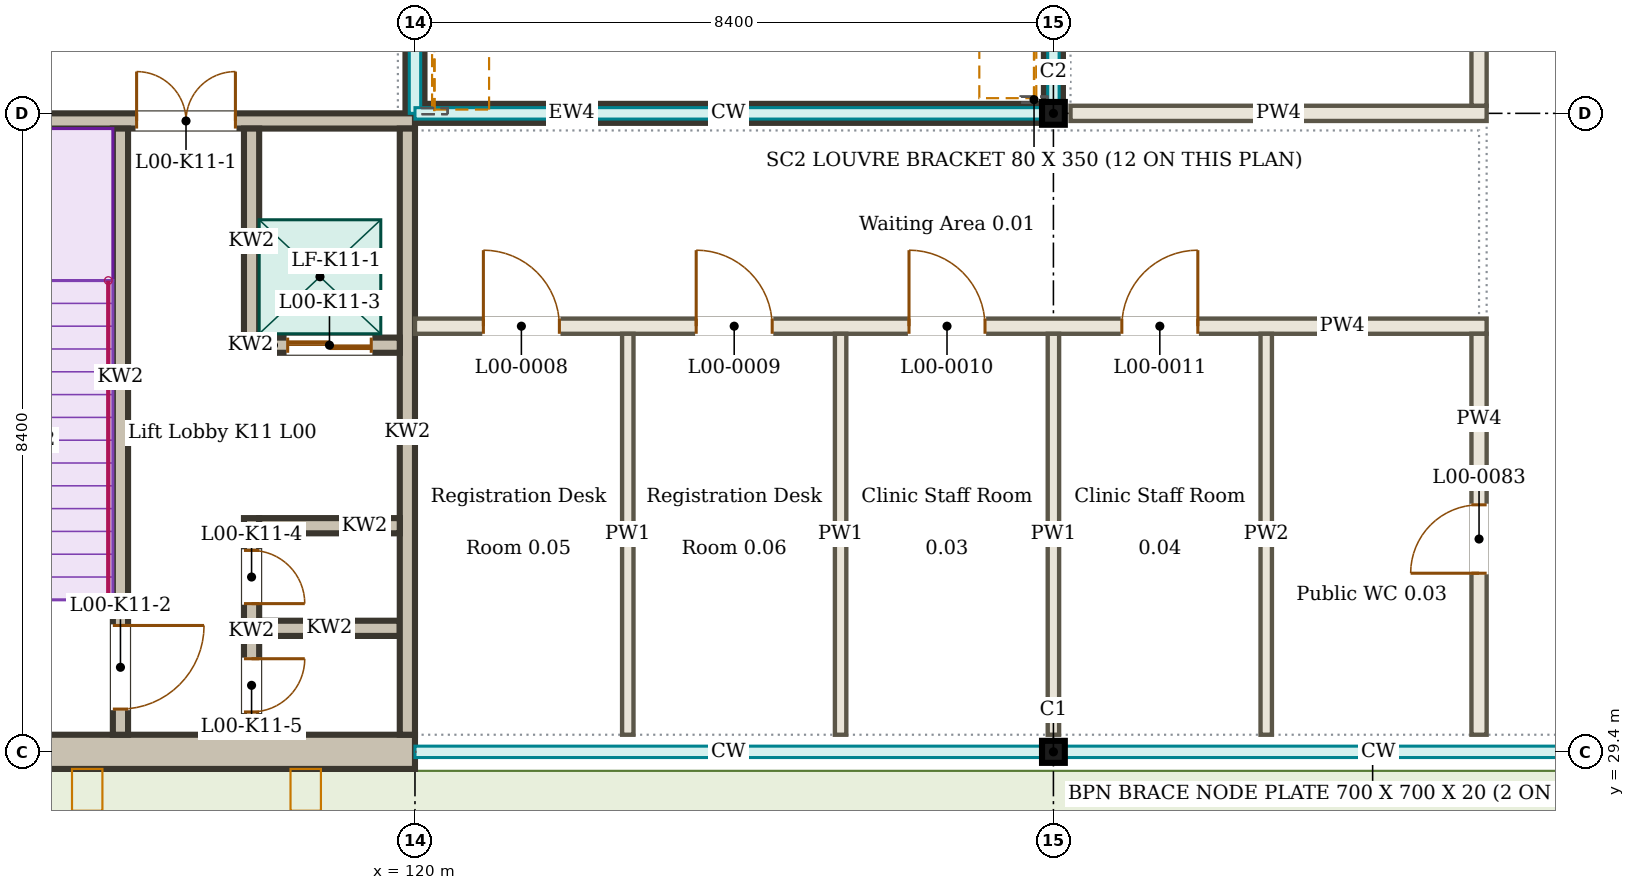
"""IFC4 building model, lengths in metres.
Left out: names, types, materials, properties, quantities, classifications, styles, units other than length and angle.
Written with IfcOpenShell. Run it as: python <this file> out.ifc"""

import sys

from ifc_helpers import new_model, si_unit, direction, frame, frame_2d, origin, origin_2d, place, context, subcontext, project, spatial, rectangle, i_section, extrude, element, fill, save


model = new_model("IFC4")
c1 = context("Model", 3, precision=1e-05, world=origin(), true_north=direction((0.0, 1.0)))
c2 = subcontext(c1, "Body", "Model", "MODEL_VIEW")
j1 = project(units=[si_unit("LENGTHUNIT", "METRE"), si_unit("PLANEANGLEUNIT", "RADIAN")], contexts=[c1])
p1 = place(None, origin())
s1 = spatial("IfcSite", under=j1, at=p1, CompositionType="ELEMENT")
p2 = place(p1, origin())
s2 = spatial("IfcBuilding", under=s1, at=p2, CompositionType="ELEMENT")
p3 = place(p2, origin())
s3 = spatial("IfcBuildingStorey", under=s2, at=p3, CompositionType="ELEMENT", Elevation=0.0)
p4 = place(p3, frame((128.4, 29.4, 0.0), z_axis=(0.0, 0.0, 1.0), x_axis=(1.0, 0.0, 0.0)))
e1 = element("IfcColumn", 1, at=p4, inside=s3, PredefinedType="COLUMN", context=c2, shape_type="SweptSolid", body=[
    extrude(i_section(OverallWidth=0.3, OverallDepth=0.29, WebThickness=0.009, FlangeThickness=0.014, FilletRadius=0.027, at=origin_2d()), origin(), (0.0, 0.0, 1.0), 4.5),
])
p5 = place(p3, frame((128.4, 37.8, 0.0), z_axis=(0.0, 0.0, 1.0), x_axis=(1.0, 0.0, 0.0)))
e2 = element("IfcColumn", 2, at=p5, inside=s3, PredefinedType="COLUMN", context=c2, shape_type="SweptSolid", body=[
    extrude(i_section(OverallWidth=0.3, OverallDepth=0.3, WebThickness=0.011, FlangeThickness=0.019, FilletRadius=0.027, at=origin_2d()), origin(), (0.0, 0.0, 1.0), 4.5),
])
p6 = place(p3, frame((120.0, 37.8, 0.0), z_axis=(0.0, 0.0, 1.0), x_axis=(0.0, 1.0, 0.0)))
e3 = element("IfcWall", 3, at=p6, inside=s3, PredefinedType="SOLIDWALL", context=c2, shape_type="SweptSolid", body=[
    extrude(rectangle(XDim=8.25, YDim=0.25, at=frame_2d((4.125, 0.0))), origin(), (0.0, 0.0, 1.0), 0.45),
])
p7 = place(p3, frame((120.16, 37.8, 3.82), z_axis=(0.0, 0.0, 1.0), x_axis=(0.0, 1.0, 0.0)))
e4 = element("IfcWall", 4, at=p7, inside=s3, PredefinedType="SOLIDWALL", context=c2, shape_type="SweptSolid", body=[
    extrude(rectangle(XDim=8.25, YDim=0.13, at=frame_2d((4.125, 0.0))), origin(), (0.0, 0.0, 1.0), 0.68),
])
p8 = place(p3, frame((120.0, 37.8, 0.0), z_axis=(0.0, 0.0, 1.0), x_axis=(1.0, 0.0, 0.0)))
e5 = element("IfcWall", 5, at=p8, inside=s3, PredefinedType="SOLIDWALL", context=c2, shape_type="SweptSolid", body=[
    extrude(rectangle(XDim=8.25, YDim=0.25, at=frame_2d((4.125, 0.0))), origin(), (0.0, 0.0, 1.0), 0.45),
])
p9 = place(p3, frame((120.0, 37.96, 3.82), z_axis=(0.0, 0.0, 1.0), x_axis=(1.0, 0.0, 0.0)))
e6 = element("IfcWall", 6, at=p9, inside=s3, PredefinedType="SOLIDWALL", context=c2, shape_type="SweptSolid", body=[
    extrude(rectangle(XDim=8.25, YDim=0.13, at=frame_2d((4.125, 0.0))), origin(), (0.0, 0.0, 1.0), 0.68),
])
p10 = place(p3, frame((128.4, 37.95, 0.0), z_axis=(0.0, 0.0, 1.0), x_axis=(0.0, 1.0, 0.0)))
e7 = element("IfcWall", 7, at=p10, inside=s3, PredefinedType="SOLIDWALL", context=c2, shape_type="SweptSolid", body=[
    extrude(rectangle(XDim=8.1, YDim=0.25, at=frame_2d((4.05, 0.0))), origin(), (0.0, 0.0, 1.0), 0.45),
])
p11 = place(p3, frame((128.24, 37.95, 3.82), z_axis=(0.0, 0.0, 1.0), x_axis=(0.0, 1.0, 0.0)))
e8 = element("IfcWall", 8, at=p11, inside=s3, PredefinedType="SOLIDWALL", context=c2, shape_type="SweptSolid", body=[
    extrude(rectangle(XDim=8.1, YDim=0.13, at=frame_2d((4.05, 0.0))), origin(), (0.0, 0.0, 1.0), 0.68),
])
p12 = place(p3, frame((120.0, 35.0, 0.0), z_axis=(0.0, 0.0, 1.0), x_axis=(1.0, 0.0, 0.0)))
e9 = element("IfcWall", 9, at=p12, inside=s3, PredefinedType="PARTITIONING", context=c2, shape_type="SweptSolid", body=[
    extrude(rectangle(XDim=14.1, YDim=0.2, at=frame_2d((7.05, 0.0))), origin(), (0.0, 0.0, 1.0), 3.8),
])
p13 = place(p12, frame((0.9, 0.0, 0.0)))
e10 = element("IfcOpeningElement", 10, at=p13, cuts=e9, PredefinedType="OPENING", context=c2, shape_type="SweptSolid", body=[
    extrude(rectangle(XDim=1.0, YDim=2.1, at=frame_2d((0.5, 1.05))), frame((0.0, 0.11, 0.0), z_axis=(0.0, -1.0, 0.0), x_axis=(1.0, 0.0, 0.0)), (0.0, 0.0, 1.0), 0.22),
])
p14 = place(p12, frame((3.7, 0.0, 0.0)))
e11 = element("IfcOpeningElement", 11, at=p14, cuts=e9, PredefinedType="OPENING", context=c2, shape_type="SweptSolid", body=[
    extrude(rectangle(XDim=1.0, YDim=2.1, at=frame_2d((0.5, 1.05))), frame((0.0, 0.11, 0.0), z_axis=(0.0, -1.0, 0.0), x_axis=(1.0, 0.0, 0.0)), (0.0, 0.0, 1.0), 0.22),
])
p15 = place(p12, frame((6.5, 0.0, 0.0)))
e12 = element("IfcOpeningElement", 12, at=p15, cuts=e9, PredefinedType="OPENING", context=c2, shape_type="SweptSolid", body=[
    extrude(rectangle(XDim=1.0, YDim=2.1, at=frame_2d((0.5, 1.05))), frame((0.0, 0.11, 0.0), z_axis=(0.0, -1.0, 0.0), x_axis=(1.0, 0.0, 0.0)), (0.0, 0.0, 1.0), 0.22),
])
p16 = place(p12, frame((9.3, 0.0, 0.0)))
e13 = element("IfcOpeningElement", 13, at=p16, cuts=e9, PredefinedType="OPENING", context=c2, shape_type="SweptSolid", body=[
    extrude(rectangle(XDim=1.0, YDim=2.1, at=frame_2d((0.5, 1.05))), frame((0.0, 0.11, 0.0), z_axis=(0.0, -1.0, 0.0), x_axis=(1.0, 0.0, 0.0)), (0.0, 0.0, 1.0), 0.22),
])
p17 = place(p3, frame((128.625, 37.8, 0.0), z_axis=(0.0, 0.0, 1.0), x_axis=(1.0, 0.0, 0.0)))
e14 = element("IfcWall", 14, at=p17, inside=s3, PredefinedType="PARTITIONING", context=c2, shape_type="SweptSolid", body=[
    extrude(rectangle(XDim=5.475, YDim=0.2, at=frame_2d((2.738, 0.0))), origin(), (0.0, 0.0, 1.0), 3.8),
])
for number, where, z_axis, x_axis in (
    (15, (122.8, 29.625, 0.0), (0.0, 0.0, 1.0), (0.0, 1.0, 0.0)),
    (16, (125.6, 29.625, 0.0), (0.0, 0.0, 1.0), (0.0, 1.0, 0.0)),
):
    element("IfcWall", number, at=place(p3, frame(where, z_axis=z_axis, x_axis=x_axis)), inside=s3, PredefinedType="PARTITIONING", context=c2, shape_type="SweptSolid", body=[
        extrude(rectangle(XDim=5.275, YDim=0.15, at=frame_2d((2.637, 0.0))), origin(), (0.0, 0.0, 1.0), 3.95),
    ])
p18 = place(p3, frame((128.4, 29.625, 0.0), z_axis=(0.0, 0.0, 1.0), x_axis=(0.0, 1.0, 0.0)))
e17 = element("IfcWall", 17, at=p18, inside=s3, PredefinedType="PARTITIONING", context=c2, shape_type="SweptSolid", body=[
    extrude(rectangle(XDim=5.275, YDim=0.15, at=frame_2d((2.637, 0.0))), origin(), (0.0, 0.0, 1.0), 3.8),
])
p19 = place(p3, frame((131.2, 29.625, 0.0), z_axis=(0.0, 0.0, 1.0), x_axis=(0.0, 1.0, 0.0)))
e18 = element("IfcWall", 18, at=p19, inside=s3, PredefinedType="PARTITIONING", context=c2, shape_type="SweptSolid", body=[
    extrude(rectangle(XDim=5.275, YDim=0.15, at=frame_2d((2.637, 0.0))), origin(), (0.0, 0.0, 1.0), 3.95),
])
p20 = place(p3, frame((134.0, 29.625, 0.0), z_axis=(0.0, 0.0, 1.0), x_axis=(0.0, 1.0, 0.0)))
e19 = element("IfcWall", 19, at=p20, inside=s3, PredefinedType="PARTITIONING", context=c2, shape_type="SweptSolid", body=[
    extrude(rectangle(XDim=5.275, YDim=0.2, at=frame_2d((2.637, 0.0))), origin(), (0.0, 0.0, 1.0), 3.95),
])
p21 = place(p20, frame((2.125, 0.0, 0.0)))
e20 = element("IfcOpeningElement", 20, at=p21, cuts=e19, PredefinedType="OPENING", context=c2, shape_type="SweptSolid", body=[
    extrude(rectangle(XDim=0.9, YDim=2.1, at=frame_2d((0.45, 1.05))), frame((0.0, 0.11, 0.0), z_axis=(0.0, -1.0, 0.0), x_axis=(1.0, 0.0, 0.0)), (0.0, 0.0, 1.0), 0.22),
])
p22 = place(p3, frame((134.0, 37.9, 0.0), z_axis=(0.0, 0.0, 1.0), x_axis=(0.0, 1.0, 0.0)))
e21 = element("IfcWall", 21, at=p22, inside=s3, PredefinedType="PARTITIONING", context=c2, shape_type="SweptSolid", body=[
    extrude(rectangle(XDim=8.225, YDim=0.2, at=frame_2d((4.113, 0.0))), origin(), (0.0, 0.0, 1.0), 3.8),
])
p23 = place(p22, frame((3.6, 0.0, 0.0)))
e22 = element("IfcOpeningElement", 22, at=p23, cuts=e21, PredefinedType="OPENING", context=c2, shape_type="SweptSolid", body=[
    extrude(rectangle(XDim=1.0, YDim=2.1, at=frame_2d((0.5, 1.05))), frame((0.0, 0.11, 0.0), z_axis=(0.0, -1.0, 0.0), x_axis=(1.0, 0.0, 0.0)), (0.0, 0.0, 1.0), 0.22),
])
p24 = place(p3, frame((111.825, 37.7, 0.0), z_axis=(0.0, 0.0, 1.0), x_axis=(1.0, 0.0, 0.0)))
e23 = element("IfcWall", 23, at=p24, inside=s3, PredefinedType="SOLIDWALL", context=c2, shape_type="SweptSolid", body=[
    extrude(rectangle(XDim=8.175, YDim=0.2, at=frame_2d((4.087, 0.0))), origin(), (0.0, 0.0, 1.0), 4.5),
])
p25 = place(p24, frame((4.512, 0.0, 0.0)))
e24 = element("IfcOpeningElement", 24, at=p25, cuts=e23, PredefinedType="OPENING", context=c2, shape_type="SweptSolid", body=[
    extrude(rectangle(XDim=1.3, YDim=2.1, at=frame_2d((0.65, 1.05))), frame((0.0, 0.11, 0.0), z_axis=(0.0, -1.0, 0.0), x_axis=(1.0, 0.0, 0.0)), (0.0, 0.0, 1.0), 0.22),
])
p26 = place(p3, frame((111.375, 29.4, 0.0), z_axis=(0.0, 0.0, 1.0), x_axis=(1.0, 0.0, 0.0)))
e25 = element("IfcWall", 25, at=p26, inside=s3, PredefinedType="SOLIDWALL", context=c2, shape_type="SweptSolid", body=[
    extrude(rectangle(XDim=8.625, YDim=0.45, at=frame_2d((4.312, 0.0))), origin(), (0.0, 0.0, 1.0), 4.5),
])
p27 = place(p26, frame((1.9, 0.0, 0.0)))
e26 = element("IfcOpeningElement", 26, at=p27, cuts=e25, PredefinedType="OPENING", context=c2, shape_type="SweptSolid", body=[
    extrude(rectangle(XDim=1.3, YDim=2.1, at=frame_2d((0.65, 1.05))), frame((0.0, 0.235, 0.0), z_axis=(0.0, -1.0, 0.0), x_axis=(1.0, 0.0, 0.0)), (0.0, 0.0, 1.0), 0.47),
])
p28 = place(p3, frame((119.9, 37.6, 0.0), z_axis=(0.0, 0.0, 1.0), x_axis=(0.0, -1.0, 0.0)))
e27 = element("IfcWall", 27, at=p28, inside=s3, PredefinedType="SOLIDWALL", context=c2, shape_type="SweptSolid", body=[
    extrude(rectangle(XDim=7.975, YDim=0.2, at=frame_2d((3.988, 0.0))), origin(), (0.0, 0.0, 1.0), 4.5),
])
p29 = place(p3, frame((116.125, 37.6, 0.0), z_axis=(0.0, 0.0, 1.0), x_axis=(0.0, -1.0, 0.0)))
e28 = element("IfcWall", 28, at=p29, inside=s3, PredefinedType="SOLIDWALL", context=c2, shape_type="SweptSolid", body=[
    extrude(rectangle(XDim=7.975, YDim=0.2, at=frame_2d((3.988, 0.0))), origin(), (0.0, 0.0, 1.0), 4.5),
])
p30 = place(p29, frame((6.538, 0.0, 0.0)))
e29 = element("IfcOpeningElement", 29, at=p30, cuts=e28, PredefinedType="OPENING", context=c2, shape_type="SweptSolid", body=[
    extrude(rectangle(XDim=1.1, YDim=2.1, at=frame_2d((0.55, 1.05))), frame((0.0, 0.11, 0.0), z_axis=(0.0, -1.0, 0.0), x_axis=(1.0, 0.0, 0.0)), (0.0, 0.0, 1.0), 0.22),
])
p31 = place(p3, frame((117.85, 37.6, 0.0), z_axis=(0.0, 0.0, 1.0), x_axis=(0.0, -1.0, 0.0)))
e30 = element("IfcWall", 30, at=p31, inside=s3, PredefinedType="SOLIDWALL", context=c2, shape_type="SweptSolid", body=[
    extrude(rectangle(XDim=2.95, YDim=0.2, at=frame_2d((1.475, 0.0))), origin(), (0.0, 0.0, 1.0), 4.5),
])
p32 = place(p3, frame((117.85, 32.475, 0.0), z_axis=(0.0, 0.0, 1.0), x_axis=(0.0, -1.0, 0.0)))
e31 = element("IfcWall", 31, at=p32, inside=s3, PredefinedType="SOLIDWALL", context=c2, shape_type="SweptSolid", body=[
    extrude(rectangle(XDim=2.85, YDim=0.2, at=frame_2d((1.425, 0.0))), origin(), (0.0, 0.0, 1.0), 4.35),
])
p33 = place(p32, frame((0.425, 0.0, 0.0)))
e32 = element("IfcOpeningElement", 32, at=p33, cuts=e31, PredefinedType="OPENING", context=c2, shape_type="SweptSolid", body=[
    extrude(rectangle(XDim=0.7, YDim=2.1, at=frame_2d((0.35, 1.05))), frame((0.0, 0.11, 0.0), z_axis=(0.0, -1.0, 0.0), x_axis=(1.0, 0.0, 0.0)), (0.0, 0.0, 1.0), 0.22),
])
p34 = place(p32, frame((1.85, 0.0, 0.0)))
e33 = element("IfcOpeningElement", 33, at=p34, cuts=e31, PredefinedType="OPENING", context=c2, shape_type="SweptSolid", body=[
    extrude(rectangle(XDim=0.7, YDim=2.1, at=frame_2d((0.35, 1.05))), frame((0.0, 0.11, 0.0), z_axis=(0.0, -1.0, 0.0), x_axis=(1.0, 0.0, 0.0)), (0.0, 0.0, 1.0), 0.22),
])
p35 = place(p3, frame((117.95, 34.75, 0.0), z_axis=(0.0, 0.0, 1.0), x_axis=(1.0, 0.0, 0.0)))
e34 = element("IfcWall", 34, at=p35, inside=s3, PredefinedType="SOLIDWALL", context=c2, shape_type="SweptSolid", body=[
    extrude(rectangle(XDim=1.85, YDim=0.2, at=frame_2d((0.925, 0.0))), origin(), (0.0, 0.0, 1.0), 4.5),
])
p36 = place(p35, frame((0.375, 0.0, 0.0)))
e35 = element("IfcOpeningElement", 35, at=p36, cuts=e34, PredefinedType="OPENING", context=c2, shape_type="SweptSolid", body=[
    extrude(rectangle(XDim=1.1, YDim=2.1, at=frame_2d((0.55, 1.05))), frame((0.0, 0.11, 0.0), z_axis=(0.0, -1.0, 0.0), x_axis=(1.0, 0.0, 0.0)), (0.0, 0.0, 1.0), 0.22),
])
for number, where, z_axis, x_axis in (
    (36, (117.95, 32.375, 0.0), (0.0, 0.0, 1.0), (1.0, 0.0, 0.0)),
    (37, (117.95, 31.025, 0.0), (0.0, 0.0, 1.0), (1.0, 0.0, 0.0)),
):
    element("IfcWall", number, at=place(p3, frame(where, z_axis=z_axis, x_axis=x_axis)), inside=s3, PredefinedType="SOLIDWALL", context=c2, shape_type="SweptSolid", body=[
        extrude(rectangle(XDim=1.85, YDim=0.2, at=frame_2d((0.925, 0.0))), origin(), (0.0, 0.0, 1.0), 4.35),
    ])
p37 = place(p13, origin())
e38 = element("IfcDoor", 38, at=p37, inside=s3, OperationType="SINGLE_SWING_LEFT", PredefinedType="DOOR", context=c2, shape_type="SweptSolid", body=[
    extrude(rectangle(XDim=1.0, YDim=2.1, at=frame_2d((0.5, 1.05))), frame((0.0, 0.025, 0.0), z_axis=(0.0, -1.0, 0.0), x_axis=(1.0, 0.0, 0.0)), (0.0, 0.0, 1.0), 0.05),
])
fill(e10, e38)
p38 = place(p14, origin())
e39 = element("IfcDoor", 39, at=p38, inside=s3, OperationType="SINGLE_SWING_LEFT", PredefinedType="DOOR", context=c2, shape_type="SweptSolid", body=[
    extrude(rectangle(XDim=1.0, YDim=2.1, at=frame_2d((0.5, 1.05))), frame((0.0, 0.025, 0.0), z_axis=(0.0, -1.0, 0.0), x_axis=(1.0, 0.0, 0.0)), (0.0, 0.0, 1.0), 0.05),
])
fill(e11, e39)
p39 = place(p15, origin())
e40 = element("IfcDoor", 40, at=p39, inside=s3, OperationType="SINGLE_SWING_LEFT", PredefinedType="DOOR", context=c2, shape_type="SweptSolid", body=[
    extrude(rectangle(XDim=1.0, YDim=2.1, at=frame_2d((0.5, 1.05))), frame((0.0, 0.025, 0.0), z_axis=(0.0, -1.0, 0.0), x_axis=(1.0, 0.0, 0.0)), (0.0, 0.0, 1.0), 0.05),
])
fill(e12, e40)
p40 = place(p16, origin())
e41 = element("IfcDoor", 41, at=p40, inside=s3, OperationType="SINGLE_SWING_RIGHT", PredefinedType="DOOR", context=c2, shape_type="SweptSolid", body=[
    extrude(rectangle(XDim=1.0, YDim=2.1, at=frame_2d((0.5, 1.05))), frame((0.0, 0.025, 0.0), z_axis=(0.0, -1.0, 0.0), x_axis=(1.0, 0.0, 0.0)), (0.0, 0.0, 1.0), 0.05),
])
fill(e13, e41)
p41 = place(p21, origin())
e42 = element("IfcDoor", 42, at=p41, inside=s3, OperationType="SINGLE_SWING_LEFT", PredefinedType="DOOR", context=c2, shape_type="SweptSolid", body=[
    extrude(rectangle(XDim=0.9, YDim=2.1, at=frame_2d((0.45, 1.05))), frame((0.0, 0.025, 0.0), z_axis=(0.0, -1.0, 0.0), x_axis=(1.0, 0.0, 0.0)), (0.0, 0.0, 1.0), 0.05),
])
fill(e20, e42)
p42 = place(p25, origin())
e43 = element("IfcDoor", 43, at=p42, inside=s3, OperationType="DOUBLE_DOOR_DOUBLE_SWING", PredefinedType="DOOR", context=c2, shape_type="SweptSolid", body=[
    extrude(rectangle(XDim=1.3, YDim=2.1, at=frame_2d((0.65, 1.05))), frame((0.0, 0.025, 0.0), z_axis=(0.0, -1.0, 0.0), x_axis=(1.0, 0.0, 0.0)), (0.0, 0.0, 1.0), 0.05),
])
fill(e24, e43)
p43 = place(p30, origin())
e44 = element("IfcDoor", 44, at=p43, inside=s3, OperationType="SINGLE_SWING_LEFT", PredefinedType="DOOR", context=c2, shape_type="SweptSolid", body=[
    extrude(rectangle(XDim=1.1, YDim=2.1, at=frame_2d((0.55, 1.05))), frame((0.0, 0.025, 0.0), z_axis=(0.0, -1.0, 0.0), x_axis=(1.0, 0.0, 0.0)), (0.0, 0.0, 1.0), 0.05),
])
fill(e29, e44)
p44 = place(p36, origin())
e45 = element("IfcDoor", 45, at=p44, inside=s3, OperationType="DOUBLE_DOOR_SLIDING", PredefinedType="DOOR", context=c2, shape_type="SweptSolid", body=[
    extrude(rectangle(XDim=1.1, YDim=2.1, at=frame_2d((0.55, 1.05))), frame((0.0, 0.025, 0.0), z_axis=(0.0, -1.0, 0.0), x_axis=(1.0, 0.0, 0.0)), (0.0, 0.0, 1.0), 0.05),
])
fill(e35, e45)
p45 = place(p33, origin())
e46 = element("IfcDoor", 46, at=p45, inside=s3, OperationType="SINGLE_SWING_RIGHT", PredefinedType="DOOR", context=c2, shape_type="SweptSolid", body=[
    extrude(rectangle(XDim=0.7, YDim=2.1, at=frame_2d((0.35, 1.05))), frame((0.0, 0.025, 0.0), z_axis=(0.0, -1.0, 0.0), x_axis=(1.0, 0.0, 0.0)), (0.0, 0.0, 1.0), 0.05),
])
fill(e32, e46)
p46 = place(p34, origin())
e47 = element("IfcDoor", 47, at=p46, inside=s3, OperationType="SINGLE_SWING_LEFT", PredefinedType="DOOR", context=c2, shape_type="SweptSolid", body=[
    extrude(rectangle(XDim=0.7, YDim=2.1, at=frame_2d((0.35, 1.05))), frame((0.0, 0.025, 0.0), z_axis=(0.0, -1.0, 0.0), x_axis=(1.0, 0.0, 0.0)), (0.0, 0.0, 1.0), 0.05),
])
fill(e33, e47)
save(model, sys.argv[1])
